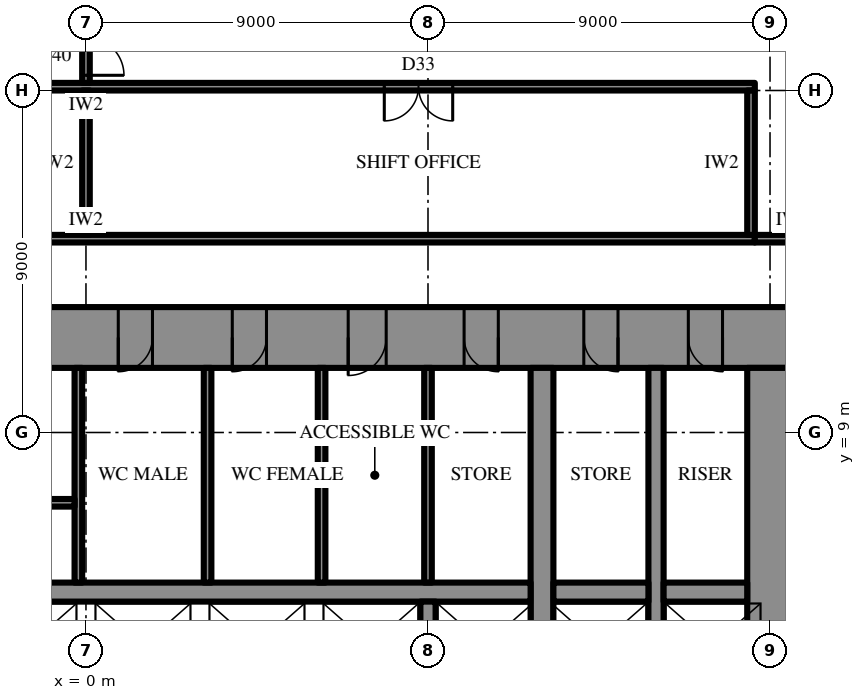
"""IFC4 building model, lengths in metres.
Left out: names, types, materials, properties, quantities, classifications, styles, units other than length and angle.
Written with IfcOpenShell. Run it as: python <this file> out.ifc"""

import sys

from ifc_helpers import new_model, si_unit, direction, frame, frame_2d, origin, place, context, subcontext, project, spatial, rectangle, extrude, element, fill, save


model = new_model("IFC4")
c1 = context("Model", 3, precision=1e-05, world=origin(), true_north=direction((0.0, 1.0)))
c2 = subcontext(c1, "Body", "Model", "MODEL_VIEW")
j1 = project(units=[si_unit("LENGTHUNIT", "METRE"), si_unit("PLANEANGLEUNIT", "RADIAN")], contexts=[c1])
p1 = place(None, origin())
s1 = spatial("IfcSite", under=j1, at=p1, CompositionType="ELEMENT")
p2 = place(p1, origin())
s2 = spatial("IfcBuilding", under=s1, at=p2, CompositionType="ELEMENT")
p3 = place(p2, frame((0.0, 0.0, 36.1)))
s3 = spatial("IfcBuildingStorey", under=s2, at=p3, CompositionType="ELEMENT", Elevation=36.1)
p4 = place(p3, frame((-18.6, 11.5, 0.0), z_axis=(0.0, 0.0, 1.0), x_axis=(1.0, 0.0, 0.0)))
e1 = element("IfcWall", 1, at=p4, inside=s3, PredefinedType="SHEAR", context=c2, shape_type="SweptSolid", body=[
    extrude(rectangle(XDim=37.2, YDim=1.6, at=frame_2d((18.6, 0.0))), origin(), (0.0, 0.0, 1.0), 4.2),
])
p5 = place(p4, frame((19.45, 0.0, 0.0)))
e2 = element("IfcOpeningElement", 2, at=p5, cuts=e1, PredefinedType="OPENING", context=c2, shape_type="SweptSolid", body=[
    extrude(rectangle(XDim=0.9, YDim=2.2, at=frame_2d((0.45, 1.1))), frame((0.0, 0.81, 0.0), z_axis=(0.0, -1.0, 0.0), x_axis=(1.0, 0.0, 0.0)), (0.0, 0.0, 1.0), 1.62),
])
p6 = place(p4, frame((22.45, 0.0, 0.0)))
e3 = element("IfcOpeningElement", 3, at=p6, cuts=e1, PredefinedType="OPENING", context=c2, shape_type="SweptSolid", body=[
    extrude(rectangle(XDim=0.9, YDim=2.2, at=frame_2d((0.45, 1.1))), frame((0.0, 0.81, 0.0), z_axis=(0.0, -1.0, 0.0), x_axis=(1.0, 0.0, 0.0)), (0.0, 0.0, 1.0), 1.62),
])
p7 = place(p4, frame((25.5, 0.0, 0.0)))
e4 = element("IfcOpeningElement", 4, at=p7, cuts=e1, PredefinedType="OPENING", context=c2, shape_type="SweptSolid", body=[
    extrude(rectangle(XDim=1.0, YDim=2.2, at=frame_2d((0.5, 1.1))), frame((0.0, 0.81, 0.0), z_axis=(0.0, -1.0, 0.0), x_axis=(1.0, 0.0, 0.0)), (0.0, 0.0, 1.0), 1.62),
])
p8 = place(p4, frame((1.85, 0.0, 0.0)))
e5 = element("IfcOpeningElement", 5, at=p8, cuts=e1, PredefinedType="OPENING", context=c2, shape_type="SweptSolid", body=[
    extrude(rectangle(XDim=0.9, YDim=2.2, at=frame_2d((0.45, 1.1))), frame((0.0, 0.81, 0.0), z_axis=(0.0, -1.0, 0.0), x_axis=(1.0, 0.0, 0.0)), (0.0, 0.0, 1.0), 1.62),
])
p9 = place(p4, frame((4.6, 0.0, 0.0)))
e6 = element("IfcOpeningElement", 6, at=p9, cuts=e1, PredefinedType="OPENING", context=c2, shape_type="SweptSolid", body=[
    extrude(rectangle(XDim=0.9, YDim=2.2, at=frame_2d((0.45, 1.1))), frame((0.0, 0.81, 0.0), z_axis=(0.0, -1.0, 0.0), x_axis=(1.0, 0.0, 0.0)), (0.0, 0.0, 1.0), 1.62),
])
p10 = place(p4, frame((7.75, 0.0, 0.0)))
e7 = element("IfcOpeningElement", 7, at=p10, cuts=e1, PredefinedType="OPENING", context=c2, shape_type="SweptSolid", body=[
    extrude(rectangle(XDim=0.9, YDim=2.2, at=frame_2d((0.45, 1.1))), frame((0.0, 0.81, 0.0), z_axis=(0.0, -1.0, 0.0), x_axis=(1.0, 0.0, 0.0)), (0.0, 0.0, 1.0), 1.62),
])
p11 = place(p4, frame((28.55, 0.0, 0.0)))
e8 = element("IfcOpeningElement", 8, at=p11, cuts=e1, PredefinedType="OPENING", context=c2, shape_type="SweptSolid", body=[
    extrude(rectangle(XDim=0.9, YDim=2.2, at=frame_2d((0.45, 1.1))), frame((0.0, 0.81, 0.0), z_axis=(0.0, -1.0, 0.0), x_axis=(1.0, 0.0, 0.0)), (0.0, 0.0, 1.0), 1.62),
])
p12 = place(p4, frame((31.7, 0.0, 0.0)))
e9 = element("IfcOpeningElement", 9, at=p12, cuts=e1, PredefinedType="OPENING", context=c2, shape_type="SweptSolid", body=[
    extrude(rectangle(XDim=0.9, YDim=2.2, at=frame_2d((0.45, 1.1))), frame((0.0, 0.81, 0.0), z_axis=(0.0, -1.0, 0.0), x_axis=(1.0, 0.0, 0.0)), (0.0, 0.0, 1.0), 1.62),
])
p13 = place(p4, frame((34.45, 0.0, 0.0)))
e10 = element("IfcOpeningElement", 10, at=p13, cuts=e1, PredefinedType="OPENING", context=c2, shape_type="SweptSolid", body=[
    extrude(rectangle(XDim=0.9, YDim=2.2, at=frame_2d((0.45, 1.1))), frame((0.0, 0.81, 0.0), z_axis=(0.0, -1.0, 0.0), x_axis=(1.0, 0.0, 0.0)), (0.0, 0.0, 1.0), 1.62),
])
p14 = place(p3, frame((18.0, -10.7, 0.0), z_axis=(0.0, 0.0, 1.0), x_axis=(0.0, 1.0, 0.0)))
e11 = element("IfcWall", 11, at=p14, inside=s3, PredefinedType="SHEAR", context=c2, shape_type="SweptSolid", body=[
    extrude(rectangle(XDim=21.4, YDim=1.2, at=frame_2d((10.7, 0.0))), origin(), (0.0, 0.0, 1.0), 4.2),
])
p15 = place(p14, frame((9.8, 0.0, 0.0)))
e12 = element("IfcOpeningElement", 12, at=p15, cuts=e11, PredefinedType="OPENING", context=c2, shape_type="SweptSolid", body=[
    extrude(rectangle(XDim=1.8, YDim=2.4, at=frame_2d((0.9, 1.2))), frame((0.0, 0.61, 0.0), z_axis=(0.0, -1.0, 0.0), x_axis=(1.0, 0.0, 0.0)), (0.0, 0.0, 1.0), 1.22),
])
p16 = place(p3, frame((12.0, -10.7, 0.0), z_axis=(0.0, 0.0, 1.0), x_axis=(0.0, 1.0, 0.0)))
e13 = element("IfcWall", 13, at=p16, inside=s3, PredefinedType="SHEAR", context=c2, shape_type="SweptSolid", body=[
    extrude(rectangle(XDim=21.4, YDim=0.6, at=frame_2d((10.7, 0.0))), origin(), (0.0, 0.0, 1.0), 4.2),
])
p17 = place(p16, frame((9.8, 0.0, 0.0)))
e14 = element("IfcOpeningElement", 14, at=p17, cuts=e13, PredefinedType="OPENING", context=c2, shape_type="SweptSolid", body=[
    extrude(rectangle(XDim=1.8, YDim=2.4, at=frame_2d((0.9, 1.2))), frame((0.0, 0.31, 0.0), z_axis=(0.0, -1.0, 0.0), x_axis=(1.0, 0.0, 0.0)), (0.0, 0.0, 1.0), 0.62),
])
p18 = place(p3, frame((15.0, -10.7, 0.0), z_axis=(0.0, 0.0, 1.0), x_axis=(0.0, 1.0, 0.0)))
e15 = element("IfcWall", 15, at=p18, inside=s3, PredefinedType="SHEAR", context=c2, shape_type="SweptSolid", body=[
    extrude(rectangle(XDim=21.4, YDim=0.4, at=frame_2d((10.7, 0.0))), origin(), (0.0, 0.0, 1.0), 4.2),
])
p19 = place(p18, frame((9.8, 0.0, 0.0)))
e16 = element("IfcOpeningElement", 16, at=p19, cuts=e15, PredefinedType="OPENING", context=c2, shape_type="SweptSolid", body=[
    extrude(rectangle(XDim=1.8, YDim=2.4, at=frame_2d((0.9, 1.2))), frame((0.0, 0.21, 0.0), z_axis=(0.0, -1.0, 0.0), x_axis=(1.0, 0.0, 0.0)), (0.0, 0.0, 1.0), 0.42),
])
p20 = place(p3, frame((-11.7, 4.8, 0.0), z_axis=(0.0, 0.0, 1.0), x_axis=(1.0, 0.0, 0.0)))
e17 = element("IfcWall", 17, at=p20, inside=s3, PredefinedType="SHEAR", context=c2, shape_type="SweptSolid", body=[
    extrude(rectangle(XDim=23.4, YDim=0.5, at=frame_2d((11.7, 0.0))), origin(), (0.0, 0.0, 1.0), 4.2),
])
p21 = place(p20, frame((6.6, 0.0, 0.0)))
e18 = element("IfcOpeningElement", 18, at=p21, cuts=e17, PredefinedType="OPENING", context=c2, shape_type="SweptSolid", body=[
    extrude(rectangle(XDim=1.2, YDim=2.2, at=frame_2d((0.6, 1.1))), frame((0.0, 0.26, 0.0), z_axis=(0.0, -1.0, 0.0), x_axis=(1.0, 0.0, 0.0)), (0.0, 0.0, 1.0), 0.52),
])
p22 = place(p20, frame((3.6, 0.0, 0.0)))
e19 = element("IfcOpeningElement", 19, at=p22, cuts=e17, PredefinedType="OPENING", context=c2, shape_type="SweptSolid", body=[
    extrude(rectangle(XDim=1.2, YDim=2.2, at=frame_2d((0.6, 1.1))), frame((0.0, 0.26, 0.0), z_axis=(0.0, -1.0, 0.0), x_axis=(1.0, 0.0, 0.0)), (0.0, 0.0, 1.0), 0.52),
])
p23 = place(p3, frame((12.3, 4.8, 0.0), z_axis=(0.0, 0.0, 1.0), x_axis=(1.0, 0.0, 0.0)))
e20 = element("IfcWall", 20, at=p23, inside=s3, PredefinedType="SHEAR", context=c2, shape_type="SweptSolid", body=[
    extrude(rectangle(XDim=2.5, YDim=0.5, at=frame_2d((1.25, 0.0))), origin(), (0.0, 0.0, 1.0), 4.2),
])
p24 = place(p3, frame((15.2, 4.8, 0.0), z_axis=(0.0, 0.0, 1.0), x_axis=(1.0, 0.0, 0.0)))
e21 = element("IfcWall", 21, at=p24, inside=s3, PredefinedType="SHEAR", context=c2, shape_type="SweptSolid", body=[
    extrude(rectangle(XDim=2.2, YDim=0.5, at=frame_2d((1.1, 0.0))), origin(), (0.0, 0.0, 1.0), 4.2),
])
p25 = place(p3, frame((9.0, 2.25, 0.0), z_axis=(0.0, 0.0, 1.0), x_axis=(0.0, 1.0, 0.0)))
e22 = element("IfcWall", 22, at=p25, inside=s3, PredefinedType="SHEAR", context=c2, shape_type="SweptSolid", body=[
    extrude(rectangle(XDim=2.3, YDim=0.4, at=frame_2d((1.15, 0.0))), origin(), (0.0, 0.0, 1.0), 4.2),
])
p26 = place(p3, frame((-0.2, 5.05, 0.0), z_axis=(0.0, 0.0, 1.0), x_axis=(0.0, 1.0, 0.0)))
e23 = element("IfcWall", 23, at=p26, inside=s3, PredefinedType="SHEAR", context=c2, shape_type="SweptSolid", body=[
    extrude(rectangle(XDim=5.65, YDim=0.2, at=frame_2d((2.825, 0.0))), origin(), (0.0, 0.0, 1.0), 4.2),
])
p27 = place(p3, frame((-8.9, 7.15, 0.0), z_axis=(0.0, 0.0, 1.0), x_axis=(1.0, 0.0, 0.0)))
e24 = element("IfcWall", 24, at=p27, inside=s3, PredefinedType="SHEAR", context=c2, shape_type="SweptSolid", body=[
    extrude(rectangle(XDim=8.6, YDim=0.2, at=frame_2d((4.3, 0.0))), origin(), (0.0, 0.0, 1.0), 4.2),
])
p28 = place(p27, frame((0.3, 0.0, 0.0)))
e25 = element("IfcOpeningElement", 25, at=p28, cuts=e24, PredefinedType="OPENING", context=c2, shape_type="SweptSolid", body=[
    extrude(rectangle(XDim=1.0, YDim=2.2, at=frame_2d((0.5, 1.1))), frame((0.0, 0.11, 0.0), z_axis=(0.0, -1.0, 0.0), x_axis=(1.0, 0.0, 0.0)), (0.0, 0.0, 1.0), 0.22),
])
for number, where, z_axis, x_axis in (
    (26, (9.0, 5.05, 0.0), (0.0, 0.0, 1.0), (0.0, 1.0, 0.0)),
    (27, (3.2, 5.05, 0.0), (0.0, 0.0, 1.0), (0.0, 1.0, 0.0)),
    (28, (6.2, 5.05, 0.0), (0.0, 0.0, 1.0), (0.0, 1.0, 0.0)),
):
    element("IfcWall", number, at=place(p3, frame(where, z_axis=z_axis, x_axis=x_axis)), inside=s3, PredefinedType="PARTITIONING", context=c2, shape_type="SweptSolid", body=[
        extrude(rectangle(XDim=5.65, YDim=0.2, at=frame_2d((2.825, 0.0))), origin(), (0.0, 0.0, 1.0), 4.0),
    ])
p29 = place(p3, frame((-17.6, 14.1, 0.0), z_axis=(0.0, 0.0, 1.0), x_axis=(1.0, 0.0, 0.0)))
e29 = element("IfcWall", 29, at=p29, inside=s3, PredefinedType="PARTITIONING", context=c2, shape_type="SweptSolid", body=[
    extrude(rectangle(XDim=35.2, YDim=0.2, at=frame_2d((17.6, 0.0))), origin(), (0.0, 0.0, 1.0), 4.0),
])
p30 = place(p3, frame((-17.6, 18.1, 0.0), z_axis=(0.0, 0.0, 1.0), x_axis=(1.0, 0.0, 0.0)))
e30 = element("IfcWall", 30, at=p30, inside=s3, PredefinedType="PARTITIONING", context=c2, shape_type="SweptSolid", body=[
    extrude(rectangle(XDim=35.2, YDim=0.2, at=frame_2d((17.6, 0.0))), origin(), (0.0, 0.0, 1.0), 4.0),
])
p31 = place(p30, frame((7.95, 0.0, 0.0)))
e31 = element("IfcOpeningElement", 31, at=p31, cuts=e30, PredefinedType="OPENING", context=c2, shape_type="SweptSolid", body=[
    extrude(rectangle(XDim=1.8, YDim=2.4, at=frame_2d((0.9, 1.2))), frame((0.0, 0.11, 0.0), z_axis=(0.0, -1.0, 0.0), x_axis=(1.0, 0.0, 0.0)), (0.0, 0.0, 1.0), 0.22),
])
p32 = place(p30, frame((25.45, 0.0, 0.0)))
e32 = element("IfcOpeningElement", 32, at=p32, cuts=e30, PredefinedType="OPENING", context=c2, shape_type="SweptSolid", body=[
    extrude(rectangle(XDim=1.8, YDim=2.4, at=frame_2d((0.9, 1.2))), frame((0.0, 0.11, 0.0), z_axis=(0.0, -1.0, 0.0), x_axis=(1.0, 0.0, 0.0)), (0.0, 0.0, 1.0), 0.22),
])
p33 = place(p3, frame((0.0, 14.2, 0.0), z_axis=(0.0, 0.0, 1.0), x_axis=(0.0, 1.0, 0.0)))
e33 = element("IfcWall", 33, at=p33, inside=s3, PredefinedType="PARTITIONING", context=c2, shape_type="SweptSolid", body=[
    extrude(rectangle(XDim=3.8, YDim=0.2, at=frame_2d((1.9, 0.0))), origin(), (0.0, 0.0, 1.0), 2.944),
])
p34 = place(p3, frame((17.5, 14.2, 0.0), z_axis=(0.0, 0.0, 1.0), x_axis=(0.0, 1.0, 0.0)))
e34 = element("IfcWall", 34, at=p34, inside=s3, PredefinedType="PARTITIONING", context=c2, shape_type="SweptSolid", body=[
    extrude(rectangle(XDim=3.8, YDim=0.2, at=frame_2d((1.9, 0.0))), origin(), (0.0, 0.0, 1.0), 4.0),
])
p35 = place(p3, frame((17.6, 14.1, 0.0), z_axis=(0.0, 0.0, 1.0), x_axis=(1.0, 0.0, 0.0)))
e35 = element("IfcWall", 35, at=p35, inside=s3, PredefinedType="PARTITIONING", context=c2, shape_type="SweptSolid", body=[
    extrude(rectangle(XDim=2.0, YDim=0.2, at=frame_2d((1.0, 0.0))), origin(), (0.0, 0.0, 1.0), 4.0),
])
p36 = place(p3, frame((0.0, 18.2, 0.0), z_axis=(0.0, 0.0, 1.0), x_axis=(0.0, 1.0, 0.0)))
e36 = element("IfcWall", 36, at=p36, inside=s3, PredefinedType="PARTITIONING", context=c2, shape_type="SweptSolid", body=[
    extrude(rectangle(XDim=6.7, YDim=0.2, at=frame_2d((3.35, 0.0))), origin(), (0.0, 0.0, 1.0), 2.944),
])
p37 = place(p36, frame((0.2, 0.0, 0.0)))
e37 = element("IfcOpeningElement", 37, at=p37, cuts=e36, PredefinedType="OPENING", context=c2, shape_type="SweptSolid", body=[
    extrude(rectangle(XDim=1.0, YDim=2.2, at=frame_2d((0.5, 1.1))), frame((0.0, 0.11, 0.0), z_axis=(0.0, -1.0, 0.0), x_axis=(1.0, 0.0, 0.0)), (0.0, 0.0, 1.0), 0.22),
])
p38 = place(p5, frame((0.9, 0.0, 0.0), z_axis=(0.0, 0.0, 1.0), x_axis=(-1.0, 0.0, 0.0)))
e38 = element("IfcDoor", 38, at=p38, inside=s3, OperationType="SINGLE_SWING_LEFT", PredefinedType="DOOR", context=c2, shape_type="SweptSolid", body=[
    extrude(rectangle(XDim=0.9, YDim=2.2, at=frame_2d((0.45, 1.1))), frame((0.0, 0.025, 0.0), z_axis=(0.0, -1.0, 0.0), x_axis=(1.0, 0.0, 0.0)), (0.0, 0.0, 1.0), 0.05),
])
fill(e2, e38)
p39 = place(p6, frame((0.9, 0.0, 0.0), z_axis=(0.0, 0.0, 1.0), x_axis=(-1.0, 0.0, 0.0)))
e39 = element("IfcDoor", 39, at=p39, inside=s3, OperationType="SINGLE_SWING_LEFT", PredefinedType="DOOR", context=c2, shape_type="SweptSolid", body=[
    extrude(rectangle(XDim=0.9, YDim=2.2, at=frame_2d((0.45, 1.1))), frame((0.0, 0.025, 0.0), z_axis=(0.0, -1.0, 0.0), x_axis=(1.0, 0.0, 0.0)), (0.0, 0.0, 1.0), 0.05),
])
fill(e3, e39)
p40 = place(p7, frame((1.0, 0.0, 0.0), z_axis=(0.0, 0.0, 1.0), x_axis=(-1.0, 0.0, 0.0)))
e40 = element("IfcDoor", 40, at=p40, inside=s3, OperationType="SINGLE_SWING_LEFT", PredefinedType="DOOR", context=c2, shape_type="SweptSolid", body=[
    extrude(rectangle(XDim=1.0, YDim=2.2, at=frame_2d((0.5, 1.1))), frame((0.0, 0.025, 0.0), z_axis=(0.0, -1.0, 0.0), x_axis=(1.0, 0.0, 0.0)), (0.0, 0.0, 1.0), 0.05),
])
fill(e4, e40)
p41 = place(p11, frame((0.9, 0.0, 0.0), z_axis=(0.0, 0.0, 1.0), x_axis=(-1.0, 0.0, 0.0)))
e41 = element("IfcDoor", 41, at=p41, inside=s3, OperationType="SINGLE_SWING_RIGHT", PredefinedType="DOOR", context=c2, shape_type="SweptSolid", body=[
    extrude(rectangle(XDim=0.9, YDim=2.2, at=frame_2d((0.45, 1.1))), frame((0.0, 0.025, 0.0), z_axis=(0.0, -1.0, 0.0), x_axis=(1.0, 0.0, 0.0)), (0.0, 0.0, 1.0), 0.05),
])
fill(e8, e41)
p42 = place(p12, frame((0.9, 0.0, 0.0), z_axis=(0.0, 0.0, 1.0), x_axis=(-1.0, 0.0, 0.0)))
e42 = element("IfcDoor", 42, at=p42, inside=s3, OperationType="SINGLE_SWING_RIGHT", PredefinedType="DOOR", context=c2, shape_type="SweptSolid", body=[
    extrude(rectangle(XDim=0.9, YDim=2.2, at=frame_2d((0.45, 1.1))), frame((0.0, 0.025, 0.0), z_axis=(0.0, -1.0, 0.0), x_axis=(1.0, 0.0, 0.0)), (0.0, 0.0, 1.0), 0.05),
])
fill(e9, e42)
p43 = place(p13, frame((0.9, 0.0, 0.0), z_axis=(0.0, 0.0, 1.0), x_axis=(-1.0, 0.0, 0.0)))
e43 = element("IfcDoor", 43, at=p43, inside=s3, OperationType="SINGLE_SWING_RIGHT", PredefinedType="DOOR", context=c2, shape_type="SweptSolid", body=[
    extrude(rectangle(XDim=0.9, YDim=2.2, at=frame_2d((0.45, 1.1))), frame((0.0, 0.025, 0.0), z_axis=(0.0, -1.0, 0.0), x_axis=(1.0, 0.0, 0.0)), (0.0, 0.0, 1.0), 0.05),
])
fill(e10, e43)
p44 = place(p32, frame((1.8, 0.0, 0.0), z_axis=(0.0, 0.0, 1.0), x_axis=(-1.0, 0.0, 0.0)))
e44 = element("IfcDoor", 44, at=p44, inside=s3, OperationType="DOUBLE_DOOR_SINGLE_SWING", PredefinedType="DOOR", context=c2, shape_type="SweptSolid", body=[
    extrude(rectangle(XDim=1.8, YDim=2.4, at=frame_2d((0.9, 1.2))), frame((0.0, 0.025, 0.0), z_axis=(0.0, -1.0, 0.0), x_axis=(1.0, 0.0, 0.0)), (0.0, 0.0, 1.0), 0.05),
])
fill(e32, e44)
p45 = place(p37, frame((1.0, 0.0, 0.0), z_axis=(0.0, 0.0, 1.0), x_axis=(-1.0, 0.0, 0.0)))
e45 = element("IfcDoor", 45, at=p45, inside=s3, OperationType="SINGLE_SWING_LEFT", PredefinedType="DOOR", context=c2, shape_type="SweptSolid", body=[
    extrude(rectangle(XDim=1.0, YDim=2.2, at=frame_2d((0.5, 1.1))), frame((0.0, 0.025, 0.0), z_axis=(0.0, -1.0, 0.0), x_axis=(1.0, 0.0, 0.0)), (0.0, 0.0, 1.0), 0.05),
])
fill(e37, e45)
save(model, sys.argv[1])
